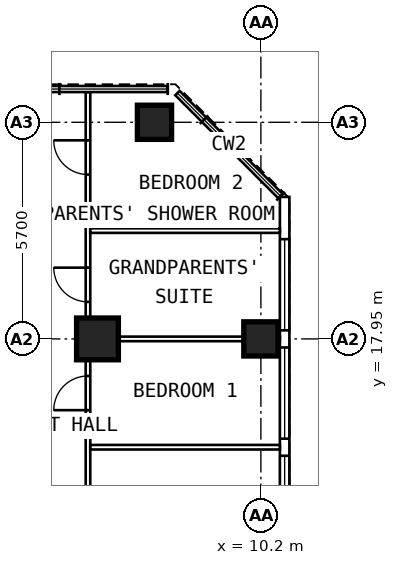
"""IFC4 building model, lengths in metres.
Left out: names, types, materials, properties, quantities, classifications, styles, units other than length and angle.
Written with IfcOpenShell. Run it as: python <this file> out.ifc"""

import sys

from ifc_helpers import new_model, si_unit, direction, frame, frame_2d, origin, origin_2d, place, context, subcontext, project, spatial, rectangle, extrude, element, fill, save


model = new_model("IFC4")
c1 = context("Model", 3, precision=1e-05, world=origin(), true_north=direction((0.0, 1.0)))
c2 = subcontext(c1, "Body", "Model", "MODEL_VIEW")
j1 = project(units=[si_unit("LENGTHUNIT", "METRE"), si_unit("PLANEANGLEUNIT", "RADIAN")], contexts=[c1])
p1 = place(None, origin())
s1 = spatial("IfcSite", under=j1, at=p1, CompositionType="ELEMENT")
p2 = place(p1, origin())
s2 = spatial("IfcBuilding", under=s1, at=p2, CompositionType="ELEMENT")
p3 = place(p2, frame((0.0, 0.0, 208.2)))
s3 = spatial("IfcBuildingStorey", under=s2, at=p3, CompositionType="ELEMENT", Elevation=208.2)
for number, where, z_axis, x_axis in (
    (1, (10.2, 17.95, 0.0), (0.0, 0.0, 1.0), (0.0, 1.0, 0.0)),
    (2, (7.4, 23.65, 0.0), (0.0, 0.0, 1.0), (0.0, 1.0, 0.0)),
):
    element("IfcColumn", number, at=place(p3, frame(where, z_axis=z_axis, x_axis=x_axis)), inside=s3, PredefinedType="COLUMN", context=c2, shape_type="SweptSolid", body=[
        extrude(rectangle(XDim=0.9, YDim=0.9, at=origin_2d()), origin(), (0.0, 0.0, 1.0), 3.6),
    ])
p4 = place(p3, frame((5.9, 17.95, 0.0), z_axis=(0.0, 0.0, 1.0), x_axis=(0.0, 1.0, 0.0)))
e3 = element("IfcColumn", 3, at=p4, inside=s3, PredefinedType="COLUMN", context=c2, shape_type="SweptSolid", body=[
    extrude(rectangle(XDim=1.1, YDim=1.1, at=origin_2d()), origin(), (0.0, 0.0, 1.0), 3.6),
])
p5 = place(p3, frame((10.825, 6.409, 0.0), z_axis=(0.0, 0.0, 1.0), x_axis=(0.0, 1.0, 0.0)))
e4 = element("IfcWall", 4, at=p5, inside=s3, PredefinedType="SOLIDWALL", context=c2, shape_type="SweptSolid", body=[
    extrude(rectangle(XDim=15.276, YDim=0.25, at=frame_2d((7.638, 0.0))), origin(), (0.0, 0.0, 1.0), 3.35),
])
p6 = place(p5, frame((0.366, 0.0, 0.8)))
e5 = element("IfcOpeningElement", 5, at=p6, cuts=e4, PredefinedType="OPENING", context=c2, shape_type="SweptSolid", body=[
    extrude(rectangle(XDim=2.4, YDim=1.8, at=frame_2d((1.2, 0.9))), frame((0.0, 0.137, 0.0), z_axis=(0.0, -1.0, 0.0), x_axis=(1.0, 0.0, 0.0)), (0.0, 0.0, 1.0), 0.274),
])
p7 = place(p5, frame((3.216, 0.0, 0.8)))
e6 = element("IfcOpeningElement", 6, at=p7, cuts=e4, PredefinedType="OPENING", context=c2, shape_type="SweptSolid", body=[
    extrude(rectangle(XDim=2.4, YDim=1.8, at=frame_2d((1.2, 0.9))), frame((0.0, 0.137, 0.0), z_axis=(0.0, -1.0, 0.0), x_axis=(1.0, 0.0, 0.0)), (0.0, 0.0, 1.0), 0.274),
])
p8 = place(p5, frame((6.066, 0.0, 0.8)))
e7 = element("IfcOpeningElement", 7, at=p8, cuts=e4, PredefinedType="OPENING", context=c2, shape_type="SweptSolid", body=[
    extrude(rectangle(XDim=2.4, YDim=1.8, at=frame_2d((1.2, 0.9))), frame((0.0, 0.137, 0.0), z_axis=(0.0, -1.0, 0.0), x_axis=(1.0, 0.0, 0.0)), (0.0, 0.0, 1.0), 0.274),
])
p9 = place(p5, frame((8.916, 0.0, 0.8)))
e8 = element("IfcOpeningElement", 8, at=p9, cuts=e4, PredefinedType="OPENING", context=c2, shape_type="SweptSolid", body=[
    extrude(rectangle(XDim=2.4, YDim=1.8, at=frame_2d((1.2, 0.9))), frame((0.0, 0.137, 0.0), z_axis=(0.0, -1.0, 0.0), x_axis=(1.0, 0.0, 0.0)), (0.0, 0.0, 1.0), 0.274),
])
p10 = place(p5, frame((11.766, 0.0, 0.8)))
e9 = element("IfcOpeningElement", 9, at=p10, cuts=e4, PredefinedType="OPENING", context=c2, shape_type="SweptSolid", body=[
    extrude(rectangle(XDim=2.4, YDim=1.8, at=frame_2d((1.2, 0.9))), frame((0.0, 0.137, 0.0), z_axis=(0.0, -1.0, 0.0), x_axis=(1.0, 0.0, 0.0)), (0.0, 0.0, 1.0), 0.274),
])
p11 = place(p3, frame((5.65, 9.6, 0.0), z_axis=(0.0, 0.0, 1.0), x_axis=(0.0, 1.0, 0.0)))
e10 = element("IfcWall", 10, at=p11, inside=s3, PredefinedType="PARTITIONING", context=c2, shape_type="SweptSolid", body=[
    extrude(rectangle(XDim=14.845, YDim=0.12, at=frame_2d((7.422, 0.0))), origin(), (0.0, 0.0, 1.0), 3.35),
])
p12 = place(p11, frame((3.35, 0.0, 0.0)))
e11 = element("IfcOpeningElement", 11, at=p12, cuts=e10, PredefinedType="OPENING", context=c2, shape_type="SweptSolid", body=[
    extrude(rectangle(XDim=0.9, YDim=2.1, at=frame_2d((0.45, 1.05))), frame((0.0, 0.072, 0.0), z_axis=(0.0, -1.0, 0.0), x_axis=(1.0, 0.0, 0.0)), (0.0, 0.0, 1.0), 0.144),
])
p13 = place(p11, frame((6.475, 0.0, 0.0)))
e12 = element("IfcOpeningElement", 12, at=p13, cuts=e10, PredefinedType="OPENING", context=c2, shape_type="SweptSolid", body=[
    extrude(rectangle(XDim=0.9, YDim=2.1, at=frame_2d((0.45, 1.05))), frame((0.0, 0.072, 0.0), z_axis=(0.0, -1.0, 0.0), x_axis=(1.0, 0.0, 0.0)), (0.0, 0.0, 1.0), 0.144),
])
p14 = place(p11, frame((9.325, 0.0, 0.0)))
e13 = element("IfcOpeningElement", 13, at=p14, cuts=e10, PredefinedType="OPENING", context=c2, shape_type="SweptSolid", body=[
    extrude(rectangle(XDim=0.9, YDim=2.1, at=frame_2d((0.45, 1.05))), frame((0.0, 0.072, 0.0), z_axis=(0.0, -1.0, 0.0), x_axis=(1.0, 0.0, 0.0)), (0.0, 0.0, 1.0), 0.144),
])
p15 = place(p11, frame((12.675, 0.0, 0.0)))
e14 = element("IfcOpeningElement", 14, at=p15, cuts=e10, PredefinedType="OPENING", context=c2, shape_type="SweptSolid", body=[
    extrude(rectangle(XDim=0.9, YDim=2.1, at=frame_2d((0.45, 1.05))), frame((0.0, 0.072, 0.0), z_axis=(0.0, -1.0, 0.0), x_axis=(1.0, 0.0, 0.0)), (0.0, 0.0, 1.0), 0.144),
])
p16 = place(p3, frame((5.71, 15.1, 0.0), z_axis=(0.0, 0.0, 1.0), x_axis=(1.0, 0.0, 0.0)))
e15 = element("IfcWall", 15, at=p16, inside=s3, PredefinedType="PARTITIONING", context=c2, shape_type="SweptSolid", body=[
    extrude(rectangle(XDim=4.99, YDim=0.12, at=frame_2d((2.495, 0.0))), origin(), (0.0, 0.0, 1.0), 3.35),
])
p17 = place(p3, frame((5.71, 17.95, 0.0), z_axis=(0.0, 0.0, 1.0), x_axis=(1.0, 0.0, 0.0)))
e16 = element("IfcWall", 16, at=p17, inside=s3, PredefinedType="PARTITIONING", context=c2, shape_type="SweptSolid", body=[
    extrude(rectangle(XDim=4.99, YDim=0.12, at=frame_2d((2.495, 0.0))), origin(), (0.0, 0.0, 1.0), 2.45),
])
p18 = place(p3, frame((5.71, 20.8, 0.0), z_axis=(0.0, 0.0, 1.0), x_axis=(1.0, 0.0, 0.0)))
e17 = element("IfcWall", 17, at=p18, inside=s3, PredefinedType="PARTITIONING", context=c2, shape_type="SweptSolid", body=[
    extrude(rectangle(XDim=4.99, YDim=0.12, at=frame_2d((2.495, 0.0))), origin(), (0.0, 0.0, 1.0), 3.35),
])
p19 = place(p8, origin())
e18 = element("IfcWindow", 18, at=p19, inside=s3, PartitioningType="SINGLE_PANEL", PredefinedType="WINDOW", context=c2, shape_type="SweptSolid", body=[
    extrude(rectangle(XDim=2.4, YDim=1.8, at=frame_2d((1.2, 0.9))), frame((0.0, 0.03, 0.0), z_axis=(0.0, -1.0, 0.0), x_axis=(1.0, 0.0, 0.0)), (0.0, 0.0, 1.0), 0.06),
])
fill(e7, e18)
p20 = place(p9, origin())
e19 = element("IfcWindow", 19, at=p20, inside=s3, PartitioningType="SINGLE_PANEL", PredefinedType="WINDOW", context=c2, shape_type="SweptSolid", body=[
    extrude(rectangle(XDim=2.4, YDim=1.8, at=frame_2d((1.2, 0.9))), frame((0.0, 0.03, 0.0), z_axis=(0.0, -1.0, 0.0), x_axis=(1.0, 0.0, 0.0)), (0.0, 0.0, 1.0), 0.06),
])
fill(e8, e19)
p21 = place(p10, origin())
e20 = element("IfcWindow", 20, at=p21, inside=s3, PartitioningType="SINGLE_PANEL", PredefinedType="WINDOW", context=c2, shape_type="SweptSolid", body=[
    extrude(rectangle(XDim=2.4, YDim=1.8, at=frame_2d((1.2, 0.9))), frame((0.0, 0.03, 0.0), z_axis=(0.0, -1.0, 0.0), x_axis=(1.0, 0.0, 0.0)), (0.0, 0.0, 1.0), 0.06),
])
fill(e9, e20)
p22 = place(p13, origin())
e21 = element("IfcDoor", 21, at=p22, inside=s3, OperationType="SINGLE_SWING_LEFT", PredefinedType="DOOR", context=c2, shape_type="SweptSolid", body=[
    extrude(rectangle(XDim=0.9, YDim=2.1, at=frame_2d((0.45, 1.05))), frame((0.0, 0.025, 0.0), z_axis=(0.0, -1.0, 0.0), x_axis=(1.0, 0.0, 0.0)), (0.0, 0.0, 1.0), 0.05),
])
fill(e12, e21)
p23 = place(p14, origin())
e22 = element("IfcDoor", 22, at=p23, inside=s3, OperationType="SINGLE_SWING_RIGHT", PredefinedType="DOOR", context=c2, shape_type="SweptSolid", body=[
    extrude(rectangle(XDim=0.9, YDim=2.1, at=frame_2d((0.45, 1.05))), frame((0.0, 0.025, 0.0), z_axis=(0.0, -1.0, 0.0), x_axis=(1.0, 0.0, 0.0)), (0.0, 0.0, 1.0), 0.05),
])
fill(e13, e22)
p24 = place(p15, origin())
e23 = element("IfcDoor", 23, at=p24, inside=s3, OperationType="SINGLE_SWING_RIGHT", PredefinedType="DOOR", context=c2, shape_type="SweptSolid", body=[
    extrude(rectangle(XDim=0.9, YDim=2.1, at=frame_2d((0.45, 1.05))), frame((0.0, 0.025, 0.0), z_axis=(0.0, -1.0, 0.0), x_axis=(1.0, 0.0, 0.0)), (0.0, 0.0, 1.0), 0.05),
])
fill(e14, e23)
save(model, sys.argv[1])
